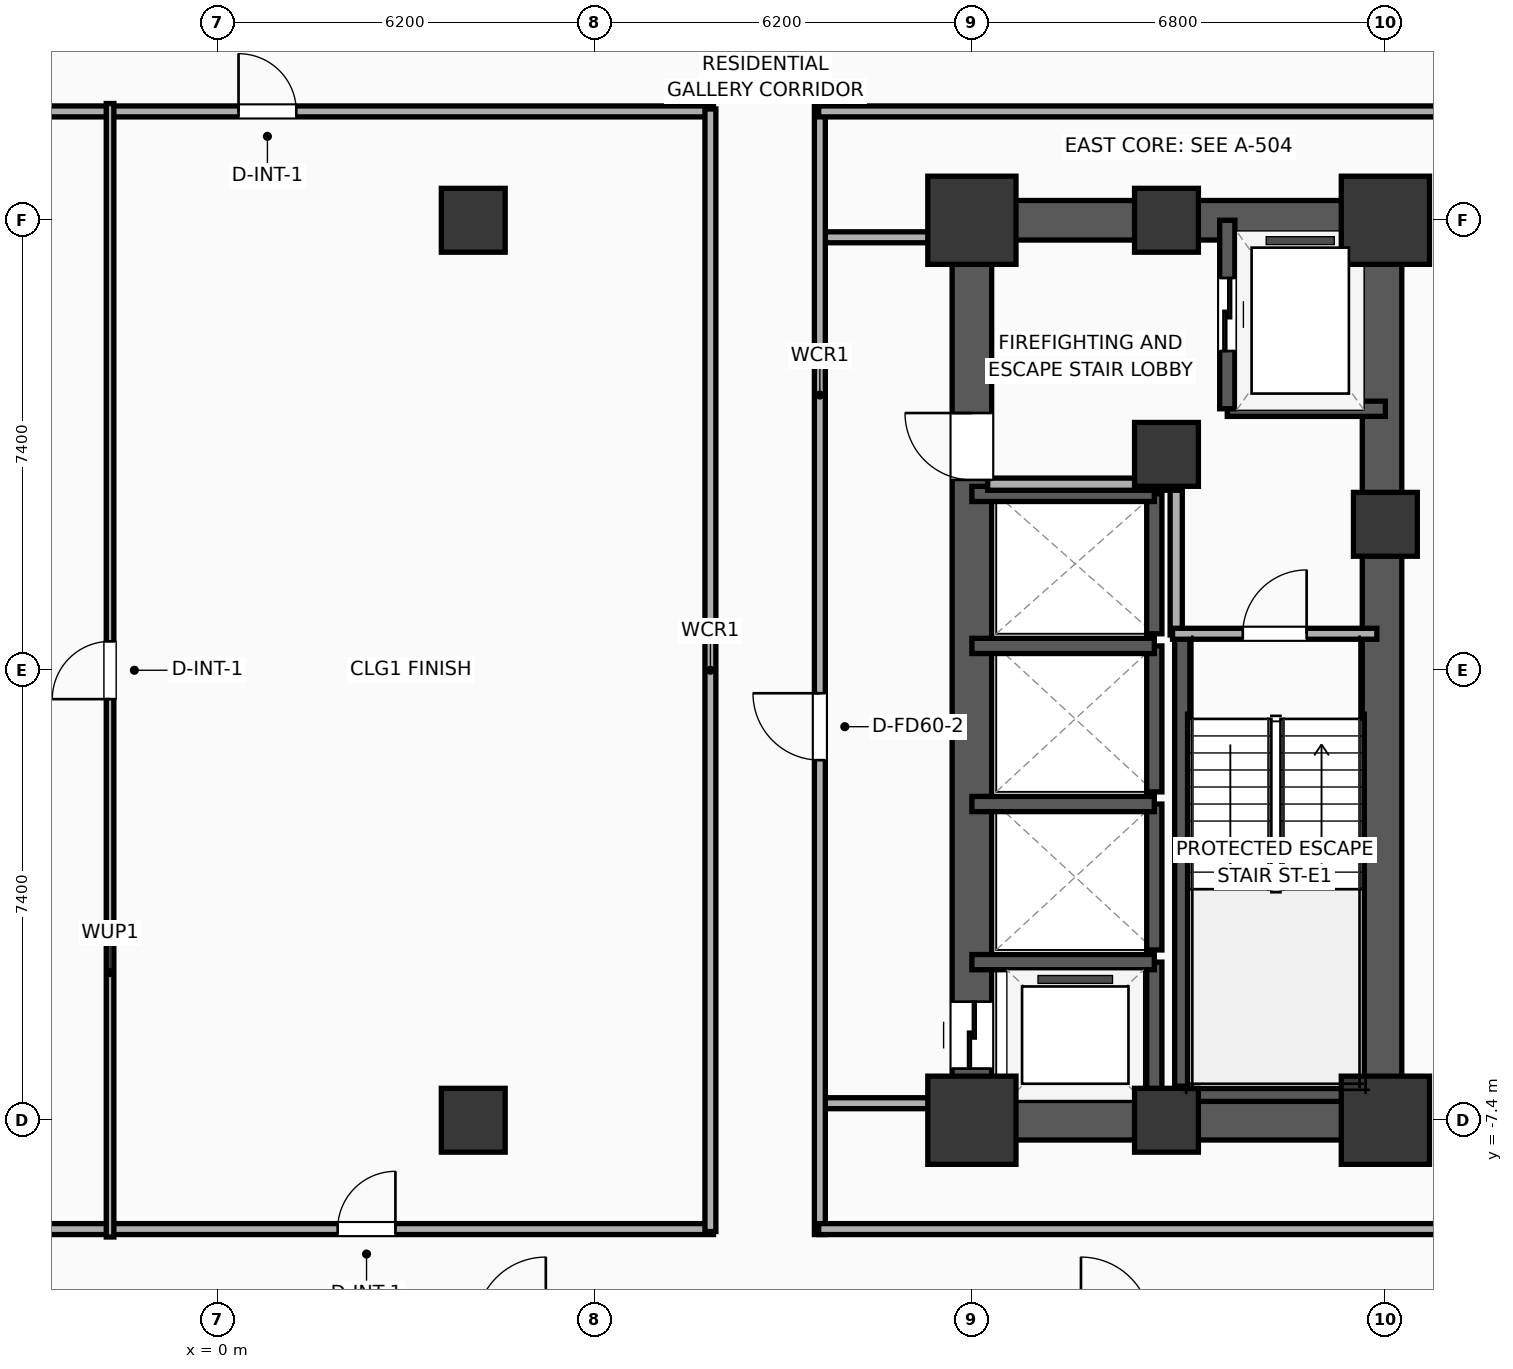
"""IFC4 building model, lengths in metres.
Left out: names, types, materials, properties, quantities, classifications, styles, units other than length and angle.
Written with IfcOpenShell. Run it as: python <this file> out.ifc"""

import sys

from ifc_helpers import new_model, si_unit, direction, frame, frame_2d, origin, origin_2d, place, context, subcontext, project, spatial, rectangle, extrude, element, fill, save


model = new_model("IFC4")
c1 = context("Model", 3, precision=1e-05, world=origin(), true_north=direction((0.0, 1.0)))
c2 = subcontext(c1, "Body", "Model", "MODEL_VIEW")
j1 = project(units=[si_unit("LENGTHUNIT", "METRE"), si_unit("PLANEANGLEUNIT", "RADIAN")], contexts=[c1])
p1 = place(None, origin())
s1 = spatial("IfcSite", under=j1, at=p1, CompositionType="ELEMENT")
p2 = place(p1, origin())
s2 = spatial("IfcBuilding", under=s1, at=p2, CompositionType="ELEMENT")
p3 = place(p2, frame((0.0, 0.0, 53.3)))
s3 = spatial("IfcBuildingStorey", under=s2, at=p3, CompositionType="ELEMENT", Elevation=53.3)
p4 = place(p3, frame((12.4, -7.4, 0.0), z_axis=(0.0, 0.0, 1.0), x_axis=(1.0, 0.0, 0.0)))
e1 = element("IfcColumn", 1, at=p4, inside=s3, PredefinedType="COLUMN", context=c2, shape_type="SweptSolid", body=[
    extrude(rectangle(XDim=1.45, YDim=1.45, at=origin_2d()), origin(), (0.0, 0.0, 1.0), 3.9),
])
p5 = place(p3, frame((15.6, 3.55, 0.0), z_axis=(0.0, 0.0, 1.0), x_axis=(1.0, 0.0, 0.0)))
e2 = element("IfcColumn", 2, at=p5, inside=s3, PredefinedType="COLUMN", context=c2, shape_type="SweptSolid", body=[
    extrude(rectangle(XDim=1.05, YDim=1.05, at=origin_2d()), origin(), (0.0, 0.0, 1.0), 3.9),
])
p6 = place(p3, frame((12.4, 7.4, 0.0), z_axis=(0.0, 0.0, 1.0), x_axis=(1.0, 0.0, 0.0)))
e3 = element("IfcColumn", 3, at=p6, inside=s3, PredefinedType="COLUMN", context=c2, shape_type="SweptSolid", body=[
    extrude(rectangle(XDim=1.45, YDim=1.45, at=origin_2d()), origin(), (0.0, 0.0, 1.0), 3.9),
])
for number, where, z_axis, x_axis in (
    (4, (15.6, -7.4, 0.0), (0.0, 0.0, 1.0), (1.0, 0.0, 0.0)),
    (5, (15.6, 7.4, 0.0), (0.0, 0.0, 1.0), (1.0, 0.0, 0.0)),
):
    element("IfcColumn", number, at=place(p3, frame(where, z_axis=z_axis, x_axis=x_axis)), inside=s3, PredefinedType="COLUMN", context=c2, shape_type="SweptSolid", body=[
        extrude(rectangle(XDim=1.05, YDim=1.05, at=origin_2d()), origin(), (0.0, 0.0, 1.0), 3.9),
    ])
p7 = place(p3, frame((19.2, -7.4, 0.0), z_axis=(0.0, 0.0, 1.0), x_axis=(1.0, 0.0, 0.0)))
e6 = element("IfcColumn", 6, at=p7, inside=s3, PredefinedType="COLUMN", context=c2, shape_type="SweptSolid", body=[
    extrude(rectangle(XDim=1.45, YDim=1.45, at=origin_2d()), origin(), (0.0, 0.0, 1.0), 3.9),
])
p8 = place(p3, frame((19.2, 2.4, 0.0), z_axis=(0.0, 0.0, 1.0), x_axis=(1.0, 0.0, 0.0)))
e7 = element("IfcColumn", 7, at=p8, inside=s3, PredefinedType="COLUMN", context=c2, shape_type="SweptSolid", body=[
    extrude(rectangle(XDim=1.05, YDim=1.05, at=origin_2d()), origin(), (0.0, 0.0, 1.0), 3.9),
])
p9 = place(p3, frame((19.2, 7.4, 0.0), z_axis=(0.0, 0.0, 1.0), x_axis=(1.0, 0.0, 0.0)))
e8 = element("IfcColumn", 8, at=p9, inside=s3, PredefinedType="COLUMN", context=c2, shape_type="SweptSolid", body=[
    extrude(rectangle(XDim=1.45, YDim=1.45, at=origin_2d()), origin(), (0.0, 0.0, 1.0), 3.9),
])
for number, where, z_axis, x_axis in (
    (9, (12.075, -7.4, 0.0), (0.0, 0.0, 1.0), (1.0, 0.0, 0.0)),
    (10, (12.075, 7.4, 0.0), (0.0, 0.0, 1.0), (1.0, 0.0, 0.0)),
):
    element("IfcWall", number, at=place(p3, frame(where, z_axis=z_axis, x_axis=x_axis)), inside=s3, PredefinedType="SHEAR", context=c2, shape_type="SweptSolid", body=[
        extrude(rectangle(XDim=7.45, YDim=0.65, at=frame_2d((3.725, 0.0))), origin(), (0.0, 0.0, 1.0), 3.65),
    ])
p10 = place(p3, frame((12.4, -7.4, 0.0), z_axis=(0.0, 0.0, 1.0), x_axis=(0.0, 1.0, 0.0)))
e11 = element("IfcWall", 11, at=p10, inside=s3, PredefinedType="SHEAR", context=c2, shape_type="SweptSolid", body=[
    extrude(rectangle(XDim=14.8, YDim=0.65, at=frame_2d((7.4, 0.0))), origin(), (0.0, 0.0, 1.0), 3.65),
])
p11 = place(p10, frame((0.85, 0.0, 0.0)))
e12 = element("IfcOpeningElement", 12, at=p11, cuts=e11, PredefinedType="OPENING", context=c2, shape_type="SweptSolid", body=[
    extrude(rectangle(XDim=1.1, YDim=2.05, at=frame_2d((0.55, 1.025))), frame((0.0, 0.335, 0.0), z_axis=(0.0, -1.0, 0.0), x_axis=(1.0, 0.0, 0.0)), (0.0, 0.0, 1.0), 0.67),
])
p12 = place(p10, frame((10.53, 0.0, 0.0)))
e13 = element("IfcOpeningElement", 13, at=p12, cuts=e11, PredefinedType="OPENING", context=c2, shape_type="SweptSolid", body=[
    extrude(rectangle(XDim=1.1, YDim=2.05, at=frame_2d((0.55, 1.025))), frame((0.0, 0.335, 0.0), z_axis=(0.0, -1.0, 0.0), x_axis=(1.0, 0.0, 0.0)), (0.0, 0.0, 1.0), 0.67),
])
p13 = place(p3, frame((19.145, -7.4, 0.0), z_axis=(0.0, 0.0, 1.0), x_axis=(0.0, 1.0, 0.0)))
e14 = element("IfcWall", 14, at=p13, inside=s3, PredefinedType="SHEAR", context=c2, shape_type="SweptSolid", body=[
    extrude(rectangle(XDim=14.8, YDim=0.65, at=frame_2d((7.4, 0.0))), origin(), (0.0, 0.0, 1.0), 3.65),
])
p14 = place(p3, frame((15.86, -7.085, 0.0), z_axis=(0.0, 0.0, 1.0), x_axis=(0.0, 1.0, 0.0)))
e15 = element("IfcWall", 15, at=p14, inside=s3, PredefinedType="SOLIDWALL", context=c2, shape_type="SweptSolid", body=[
    extrude(rectangle(XDim=7.685, YDim=0.25, at=frame_2d((3.843, 0.0))), origin(), (0.0, 0.0, 1.0), 3.65),
])
p15 = place(p3, frame((15.74, -6.965, 0.0), z_axis=(0.0, 0.0, 1.0), x_axis=(1.0, 0.0, 0.0)))
e16 = element("IfcWall", 16, at=p15, inside=s3, PredefinedType="SOLIDWALL", context=c2, shape_type="SweptSolid", body=[
    extrude(rectangle(XDim=3.46, YDim=0.25, at=frame_2d((1.73, 0.0))), origin(), (0.0, 0.0, 1.0), 3.65),
])
for number, where, z_axis, x_axis in (
    (17, (4.2, -7.4, 0.0), (0.0, 0.0, 1.0), (1.0, 0.0, 0.0)),
    (18, (4.2, 7.4, 0.0), (0.0, 0.0, 1.0), (1.0, 0.0, 0.0)),
):
    element("IfcColumn", number, at=place(p3, frame(where, z_axis=z_axis, x_axis=x_axis)), inside=s3, PredefinedType="COLUMN", context=c2, shape_type="SweptSolid", body=[
        extrude(rectangle(XDim=1.05, YDim=1.05, at=origin_2d()), origin(), (0.0, 0.0, 1.0), 3.9),
    ])
p16 = place(p3, frame((16.6, 4.3, 0.0), z_axis=(0.0, 0.0, 1.0), x_axis=(1.0, 0.0, 0.0)))
e19 = element("IfcWall", 19, at=p16, inside=s3, PredefinedType="SOLIDWALL", context=c2, shape_type="SweptSolid", body=[
    extrude(rectangle(XDim=2.6, YDim=0.25, at=frame_2d((1.3, 0.0))), origin(), (0.0, 0.0, 1.0), 3.65),
])
p17 = place(p3, frame((16.6, 7.4, 0.0), z_axis=(0.0, 0.0, 1.0), x_axis=(0.0, -1.0, 0.0)))
e20 = element("IfcWall", 20, at=p17, inside=s3, PredefinedType="SOLIDWALL", context=c2, shape_type="SweptSolid", body=[
    extrude(rectangle(XDim=3.1, YDim=0.25, at=frame_2d((1.55, 0.0))), origin(), (0.0, 0.0, 1.0), 3.65),
])
p18 = place(p17, frame((0.95, 0.0, 0.0)))
e21 = element("IfcOpeningElement", 21, at=p18, cuts=e20, PredefinedType="OPENING", context=c2, shape_type="SweptSolid", body=[
    extrude(rectangle(XDim=1.2, YDim=2.05, at=frame_2d((0.6, 1.025))), frame((0.0, 0.135, 0.0), z_axis=(0.0, -1.0, 0.0), x_axis=(1.0, 0.0, 0.0)), (0.0, 0.0, 1.0), 0.27),
])
p19 = place(p3, frame((15.4, -7.4, 0.0), z_axis=(0.0, 0.0, 1.0), x_axis=(0.0, 1.0, 0.0)))
e22 = element("IfcWall", 22, at=p19, inside=s3, PredefinedType="SOLIDWALL", context=c2, shape_type="SweptSolid", body=[
    extrude(rectangle(XDim=2.6, YDim=0.25, at=frame_2d((1.3, 0.0))), origin(), (0.0, 0.0, 1.0), 3.65),
])
p20 = place(p3, frame((15.4, -4.8, 0.0), z_axis=(0.0, 0.0, 1.0), x_axis=(-1.0, 0.0, 0.0)))
e23 = element("IfcWall", 23, at=p20, inside=s3, PredefinedType="SOLIDWALL", context=c2, shape_type="SweptSolid", body=[
    extrude(rectangle(XDim=3.0, YDim=0.25, at=frame_2d((1.5, 0.0))), origin(), (0.0, 0.0, 1.0), 3.65),
])
p21 = place(p3, frame((15.4, -4.6, 0.0), z_axis=(0.0, 0.0, 1.0), x_axis=(0.0, 1.0, 0.0)))
e24 = element("IfcWall", 24, at=p21, inside=s3, PredefinedType="SOLIDWALL", context=c2, shape_type="SweptSolid", body=[
    extrude(rectangle(XDim=2.4, YDim=0.25, at=frame_2d((1.2, 0.0))), origin(), (0.0, 0.0, 1.0), 3.65),
])
p22 = place(p3, frame((15.4, -2.2, 0.0), z_axis=(0.0, 0.0, 1.0), x_axis=(-1.0, 0.0, 0.0)))
e25 = element("IfcWall", 25, at=p22, inside=s3, PredefinedType="SOLIDWALL", context=c2, shape_type="SweptSolid", body=[
    extrude(rectangle(XDim=3.0, YDim=0.25, at=frame_2d((1.5, 0.0))), origin(), (0.0, 0.0, 1.0), 3.65),
])
p23 = place(p3, frame((15.4, -2.0, 0.0), z_axis=(0.0, 0.0, 1.0), x_axis=(0.0, 1.0, 0.0)))
e26 = element("IfcWall", 26, at=p23, inside=s3, PredefinedType="SOLIDWALL", context=c2, shape_type="SweptSolid", body=[
    extrude(rectangle(XDim=2.4, YDim=0.25, at=frame_2d((1.2, 0.0))), origin(), (0.0, 0.0, 1.0), 3.65),
])
p24 = place(p3, frame((15.4, 0.4, 0.0), z_axis=(0.0, 0.0, 1.0), x_axis=(-1.0, 0.0, 0.0)))
e27 = element("IfcWall", 27, at=p24, inside=s3, PredefinedType="SOLIDWALL", context=c2, shape_type="SweptSolid", body=[
    extrude(rectangle(XDim=3.0, YDim=0.25, at=frame_2d((1.5, 0.0))), origin(), (0.0, 0.0, 1.0), 3.65),
])
p25 = place(p3, frame((15.4, 0.6, 0.0), z_axis=(0.0, 0.0, 1.0), x_axis=(0.0, 1.0, 0.0)))
e28 = element("IfcWall", 28, at=p25, inside=s3, PredefinedType="SOLIDWALL", context=c2, shape_type="SweptSolid", body=[
    extrude(rectangle(XDim=2.3, YDim=0.25, at=frame_2d((1.15, 0.0))), origin(), (0.0, 0.0, 1.0), 3.65),
])
p26 = place(p3, frame((15.4, 2.9, 0.0), z_axis=(0.0, 0.0, 1.0), x_axis=(-1.0, 0.0, 0.0)))
e29 = element("IfcWall", 29, at=p26, inside=s3, PredefinedType="SOLIDWALL", context=c2, shape_type="SweptSolid", body=[
    extrude(rectangle(XDim=3.0, YDim=0.25, at=frame_2d((1.5, 0.0))), origin(), (0.0, 0.0, 1.0), 3.65),
])
p27 = place(p3, frame((15.76, 0.58, 0.0), z_axis=(0.0, 0.0, 1.0), x_axis=(0.0, 1.0, 0.0)))
e30 = element("IfcWall", 30, at=p27, inside=s3, PredefinedType="PARTITIONING", context=c2, shape_type="SweptSolid", body=[
    extrude(rectangle(XDim=2.52, YDim=0.2, at=frame_2d((1.26, 0.0))), origin(), (0.0, 0.0, 1.0), 3.65),
])
p28 = place(p3, frame((12.66, 3.06, 0.0), z_axis=(0.0, 0.0, 1.0), x_axis=(1.0, 0.0, 0.0)))
e31 = element("IfcWall", 31, at=p28, inside=s3, PredefinedType="PARTITIONING", context=c2, shape_type="SweptSolid", body=[
    extrude(rectangle(XDim=3.16, YDim=0.2, at=frame_2d((1.58, 0.0))), origin(), (0.0, 0.0, 1.0), 3.65),
])
p29 = place(p3, frame((15.7, 0.6, 0.0), z_axis=(0.0, 0.0, 1.0), x_axis=(1.0, 0.0, 0.0)))
e32 = element("IfcWall", 32, at=p29, inside=s3, PredefinedType="PARTITIONING", context=c2, shape_type="SweptSolid", body=[
    extrude(rectangle(XDim=3.36, YDim=0.18, at=frame_2d((1.68, 0.0))), origin(), (0.0, 0.0, 1.0), 3.65),
])
p30 = place(p29, frame((1.155, 0.0, 0.0)))
e33 = element("IfcOpeningElement", 33, at=p30, cuts=e32, PredefinedType="OPENING", context=c2, shape_type="SweptSolid", body=[
    extrude(rectangle(XDim=1.05, YDim=2.05, at=frame_2d((0.525, 1.025))), frame((0.0, 0.1, 0.0), z_axis=(0.0, -1.0, 0.0), x_axis=(1.0, 0.0, 0.0)), (0.0, 0.0, 1.0), 0.2),
])
for number, where, z_axis, x_axis in (
    (34, (9.88, 7.12, 0.0), (0.0, 0.0, 1.0), (1.0, 0.0, 0.0)),
    (35, (9.88, -7.12, 0.0), (0.0, 0.0, 1.0), (1.0, 0.0, 0.0)),
):
    element("IfcWall", number, at=place(p3, frame(where, z_axis=z_axis, x_axis=x_axis)), inside=s3, PredefinedType="PARTITIONING", context=c2, shape_type="SweptSolid", body=[
        extrude(rectangle(XDim=2.27, YDim=0.18, at=frame_2d((1.135, 0.0))), origin(), (0.0, 0.0, 1.0), 2.94),
    ])
p31 = place(p3, frame((9.9, -9.28, 0.0), z_axis=(0.0, 0.0, 1.0), x_axis=(0.0, 1.0, 0.0)))
e36 = element("IfcWall", 36, at=p31, inside=s3, PredefinedType="PARTITIONING", context=c2, shape_type="SweptSolid", body=[
    extrude(rectangle(XDim=18.56, YDim=0.18, at=frame_2d((9.28, 0.0))), origin(), (0.0, 0.0, 1.0), 3.65),
])
p32 = place(p31, frame((7.802, 0.0, 0.0)))
e37 = element("IfcOpeningElement", 37, at=p32, cuts=e36, PredefinedType="OPENING", context=c2, shape_type="SweptSolid", body=[
    extrude(rectangle(XDim=1.1, YDim=2.05, at=frame_2d((0.55, 1.025))), frame((0.0, 0.1, 0.0), z_axis=(0.0, -1.0, 0.0), x_axis=(1.0, 0.0, 0.0)), (0.0, 0.0, 1.0), 0.2),
])
p33 = place(p3, frame((9.88, 9.19, 0.0), z_axis=(0.0, 0.0, 1.0), x_axis=(1.0, 0.0, 0.0)))
e38 = element("IfcWall", 38, at=p33, inside=s3, PredefinedType="PARTITIONING", context=c2, shape_type="SweptSolid", body=[
    extrude(rectangle(XDim=16.33, YDim=0.18, at=frame_2d((8.165, 0.0))), origin(), (0.0, 0.0, 1.0), 3.65),
])
p34 = place(p33, frame((14.365, 0.0, 0.0)))
e39 = element("IfcOpeningElement", 39, at=p34, cuts=e38, PredefinedType="OPENING", context=c2, shape_type="SweptSolid", body=[
    extrude(rectangle(XDim=0.9, YDim=2.05, at=frame_2d((0.45, 1.025))), frame((0.0, 0.1, 0.0), z_axis=(0.0, -1.0, 0.0), x_axis=(1.0, 0.0, 0.0)), (0.0, 0.0, 1.0), 0.2),
])
p35 = place(p3, frame((9.88, -9.19, 0.0), z_axis=(0.0, 0.0, 1.0), x_axis=(1.0, 0.0, 0.0)))
e40 = element("IfcWall", 40, at=p35, inside=s3, PredefinedType="PARTITIONING", context=c2, shape_type="SweptSolid", body=[
    extrude(rectangle(XDim=16.33, YDim=0.18, at=frame_2d((8.165, 0.0))), origin(), (0.0, 0.0, 1.0), 3.65),
])
p36 = place(p3, frame((-8.15, 9.19, 0.0), z_axis=(0.0, 0.0, 1.0), x_axis=(1.0, 0.0, 0.0)))
e41 = element("IfcWall", 41, at=p36, inside=s3, PredefinedType="PARTITIONING", context=c2, shape_type="SweptSolid", body=[
    extrude(rectangle(XDim=16.3, YDim=0.18, at=frame_2d((8.15, 0.0))), origin(), (0.0, 0.0, 1.0), 3.65),
])
p37 = place(p36, frame((8.49, 0.0, 0.0)))
e42 = element("IfcOpeningElement", 42, at=p37, cuts=e41, PredefinedType="OPENING", context=c2, shape_type="SweptSolid", body=[
    extrude(rectangle(XDim=0.95, YDim=2.05, at=frame_2d((0.475, 1.025))), frame((0.0, 0.1, 0.0), z_axis=(0.0, -1.0, 0.0), x_axis=(1.0, 0.0, 0.0)), (0.0, 0.0, 1.0), 0.2),
])
p38 = place(p3, frame((-8.15, -9.19, 0.0), z_axis=(0.0, 0.0, 1.0), x_axis=(1.0, 0.0, 0.0)))
e43 = element("IfcWall", 43, at=p38, inside=s3, PredefinedType="PARTITIONING", context=c2, shape_type="SweptSolid", body=[
    extrude(rectangle(XDim=16.3, YDim=0.18, at=frame_2d((8.15, 0.0))), origin(), (0.0, 0.0, 1.0), 3.65),
])
p39 = place(p38, frame((1.13, 0.0, 0.0)))
e44 = element("IfcOpeningElement", 44, at=p39, cuts=e43, PredefinedType="OPENING", context=c2, shape_type="SweptSolid", body=[
    extrude(rectangle(XDim=1.0, YDim=2.05, at=frame_2d((0.5, 1.025))), frame((0.0, 0.1, 0.0), z_axis=(0.0, -1.0, 0.0), x_axis=(1.0, 0.0, 0.0)), (0.0, 0.0, 1.0), 0.2),
])
p40 = place(p38, frame((10.12, 0.0, 0.0)))
e45 = element("IfcOpeningElement", 45, at=p40, cuts=e43, PredefinedType="OPENING", context=c2, shape_type="SweptSolid", body=[
    extrude(rectangle(XDim=0.95, YDim=2.05, at=frame_2d((0.475, 1.025))), frame((0.0, 0.1, 0.0), z_axis=(0.0, -1.0, 0.0), x_axis=(1.0, 0.0, 0.0)), (0.0, 0.0, 1.0), 0.2),
])
p41 = place(p3, frame((8.1, -9.23, 0.0), z_axis=(0.0, 0.0, 1.0), x_axis=(0.0, 1.0, 0.0)))
e46 = element("IfcWall", 46, at=p41, inside=s3, PredefinedType="PARTITIONING", context=c2, shape_type="SweptSolid", body=[
    extrude(rectangle(XDim=18.46, YDim=0.18, at=frame_2d((9.23, 0.0))), origin(), (0.0, 0.0, 1.0), 3.65),
])
p42 = place(p3, frame((-1.773, -9.32, 0.0), z_axis=(0.0, 0.0, 1.0), x_axis=(0.0, 1.0, 0.0)))
e47 = element("IfcWall", 47, at=p42, inside=s3, PredefinedType="PARTITIONING", context=c2, shape_type="SweptSolid", body=[
    extrude(rectangle(XDim=18.64, YDim=0.125, at=frame_2d((9.32, 0.0))), origin(), (0.0, 0.0, 1.0), 3.65),
])
p43 = place(p42, frame((8.845, 0.0, 0.0)))
e48 = element("IfcOpeningElement", 48, at=p43, cuts=e47, PredefinedType="OPENING", context=c2, shape_type="SweptSolid", body=[
    extrude(rectangle(XDim=0.95, YDim=2.05, at=frame_2d((0.475, 1.025))), frame((0.0, 0.073, 0.0), z_axis=(0.0, -1.0, 0.0), x_axis=(1.0, 0.0, 0.0)), (0.0, 0.0, 1.0), 0.145),
])
p44 = place(p18, origin())
e49 = element("IfcDoor", 49, at=p44, inside=s3, OperationType="SLIDING_TO_LEFT", PredefinedType="DOOR", context=c2, shape_type="SweptSolid", body=[
    extrude(rectangle(XDim=1.2, YDim=2.05, at=frame_2d((0.6, 1.025))), frame((0.0, 0.025, 0.0), z_axis=(0.0, -1.0, 0.0), x_axis=(1.0, 0.0, 0.0)), (0.0, 0.0, 1.0), 0.05),
])
fill(e21, e49)
p45 = place(p11, origin())
e50 = element("IfcDoor", 50, at=p45, inside=s3, OperationType="SLIDING_TO_LEFT", PredefinedType="DOOR", context=c2, shape_type="SweptSolid", body=[
    extrude(rectangle(XDim=1.1, YDim=2.05, at=frame_2d((0.55, 1.025))), frame((0.0, 0.025, 0.0), z_axis=(0.0, -1.0, 0.0), x_axis=(1.0, 0.0, 0.0)), (0.0, 0.0, 1.0), 0.05),
])
fill(e12, e50)
p46 = place(p30, origin())
e51 = element("IfcDoor", 51, at=p46, inside=s3, OperationType="SINGLE_SWING_RIGHT", PredefinedType="DOOR", context=c2, shape_type="SweptSolid", body=[
    extrude(rectangle(XDim=1.05, YDim=2.05, at=frame_2d((0.525, 1.025))), frame((0.0, 0.025, 0.0), z_axis=(0.0, -1.0, 0.0), x_axis=(1.0, 0.0, 0.0)), (0.0, 0.0, 1.0), 0.05),
])
fill(e33, e51)
p47 = place(p32, origin())
e52 = element("IfcDoor", 52, at=p47, inside=s3, OperationType="SINGLE_SWING_RIGHT", PredefinedType="DOOR", context=c2, shape_type="SweptSolid", body=[
    extrude(rectangle(XDim=1.1, YDim=2.05, at=frame_2d((0.55, 1.025))), frame((0.0, 0.025, 0.0), z_axis=(0.0, -1.0, 0.0), x_axis=(1.0, 0.0, 0.0)), (0.0, 0.0, 1.0), 0.05),
])
fill(e37, e52)
p48 = place(p37, origin())
e53 = element("IfcDoor", 53, at=p48, inside=s3, OperationType="SINGLE_SWING_LEFT", PredefinedType="DOOR", context=c2, shape_type="SweptSolid", body=[
    extrude(rectangle(XDim=0.95, YDim=2.05, at=frame_2d((0.475, 1.025))), frame((0.0, 0.025, 0.0), z_axis=(0.0, -1.0, 0.0), x_axis=(1.0, 0.0, 0.0)), (0.0, 0.0, 1.0), 0.05),
])
fill(e42, e53)
p49 = place(p40, origin())
e54 = element("IfcDoor", 54, at=p49, inside=s3, OperationType="SINGLE_SWING_RIGHT", PredefinedType="DOOR", context=c2, shape_type="SweptSolid", body=[
    extrude(rectangle(XDim=0.95, YDim=2.05, at=frame_2d((0.475, 1.025))), frame((0.0, 0.025, 0.0), z_axis=(0.0, -1.0, 0.0), x_axis=(1.0, 0.0, 0.0)), (0.0, 0.0, 1.0), 0.05),
])
fill(e45, e54)
p50 = place(p43, origin())
e55 = element("IfcDoor", 55, at=p50, inside=s3, OperationType="SINGLE_SWING_LEFT", PredefinedType="DOOR", context=c2, shape_type="SweptSolid", body=[
    extrude(rectangle(XDim=0.95, YDim=2.05, at=frame_2d((0.475, 1.025))), frame((0.0, 0.025, 0.0), z_axis=(0.0, -1.0, 0.0), x_axis=(1.0, 0.0, 0.0)), (0.0, 0.0, 1.0), 0.05),
])
fill(e48, e55)
p51 = place(p12, origin())
e56 = element("IfcDoor", 56, at=p51, inside=s3, OperationType="SINGLE_SWING_RIGHT", PredefinedType="DOOR", context=c2, shape_type="SweptSolid", body=[
    extrude(rectangle(XDim=1.1, YDim=2.05, at=frame_2d((0.55, 1.025))), frame((0.0, 0.025, 0.0), z_axis=(0.0, -1.0, 0.0), x_axis=(1.0, 0.0, 0.0)), (0.0, 0.0, 1.0), 0.05),
])
fill(e13, e56)
save(model, sys.argv[1])
